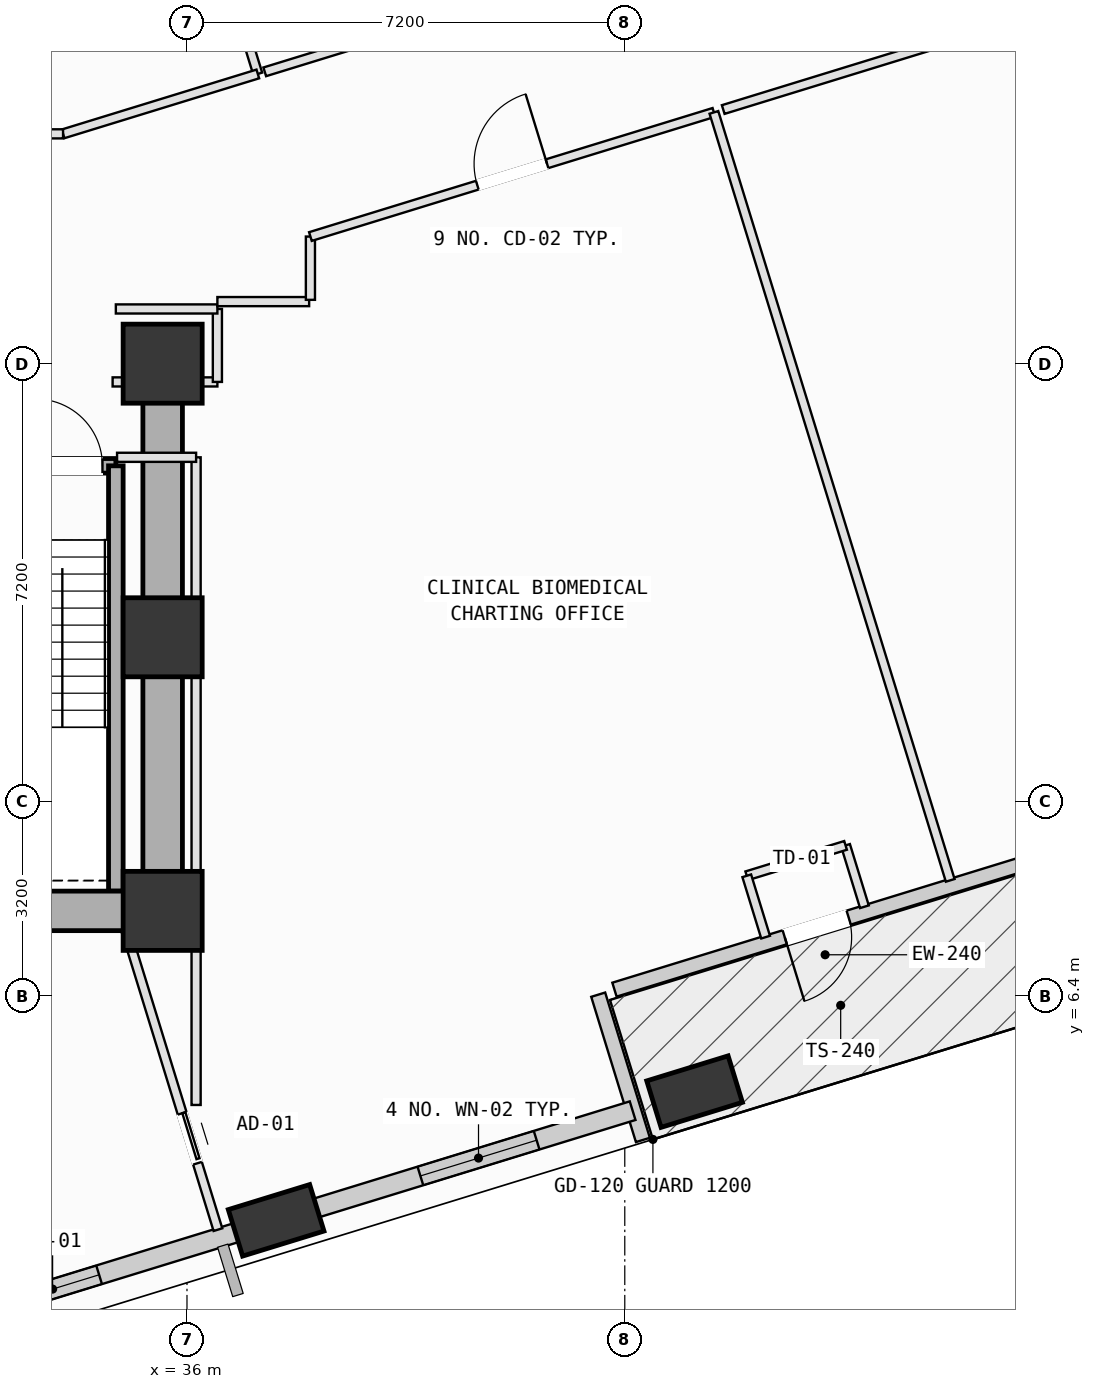
"""IFC4 building model, lengths in metres.
Left out: names, types, materials, properties, quantities, classifications, styles, units other than length and angle.
Written with IfcOpenShell. Run it as: python <this file> out.ifc"""

import sys

from ifc_helpers import new_model, si_unit, direction, frame, frame_2d, origin, origin_2d, place, context, subcontext, project, spatial, rectangle, extrude, element, fill, save


model = new_model("IFC4")
c1 = context("Model", 3, precision=1e-05, world=origin(), true_north=direction((0.0, 1.0)))
c2 = subcontext(c1, "Body", "Model", "MODEL_VIEW")
j1 = project(units=[si_unit("LENGTHUNIT", "METRE"), si_unit("PLANEANGLEUNIT", "RADIAN")], contexts=[c1])
p1 = place(None, origin())
s1 = spatial("IfcSite", under=j1, at=p1, CompositionType="ELEMENT")
p2 = place(p1, origin())
s2 = spatial("IfcBuilding", under=s1, at=p2, CompositionType="ELEMENT")
p3 = place(p2, frame((0.0, 0.0, 96.4)))
s3 = spatial("IfcBuildingStorey", under=s2, at=p3, CompositionType="ELEMENT", Elevation=96.4)
for number, where, z_axis, x_axis in (
    (1, (35.6, 7.8, 0.0), (0.0, 0.0, 1.0), (1.0, 0.0, 0.0)),
    (2, (35.6, 12.3, 0.0), (0.0, 0.0, 1.0), (1.0, 0.0, 0.0)),
    (3, (35.6, 16.8, 0.0), (0.0, 0.0, 1.0), (1.0, 0.0, 0.0)),
):
    element("IfcColumn", number, at=place(p3, frame(where, z_axis=z_axis, x_axis=x_axis)), inside=s3, PredefinedType="COLUMN", context=c2, shape_type="SweptSolid", body=[
        extrude(rectangle(XDim=1.3, YDim=1.3, at=origin_2d()), origin(), (0.0, 0.0, 1.0), 4.0),
    ])
p4 = place(p3, frame((37.466, 2.71, 0.002), z_axis=(0.091060551316, 0.016727890188, 0.995704852697), x_axis=(-0.460649221978, 0.887164683089, 0.027223507694)))
e4 = element("IfcColumn", 4, at=p4, inside=s3, PredefinedType="COLUMN", context=c2, shape_type="SweptSolid", body=[
    extrude(rectangle(XDim=1.4, YDim=0.8, at=origin_2d()), origin(), (0.0, 0.0, 1.0), 4.014),
])
p5 = place(p3, frame((44.348, 4.827, 0.002), z_axis=(0.082049974213, 0.045069704145, 0.995608619639), x_axis=(-0.716749237193, 0.696787516623, 0.027526126896)))
e5 = element("IfcColumn", 5, at=p5, inside=s3, PredefinedType="COLUMN", context=c2, shape_type="SweptSolid", body=[
    extrude(rectangle(XDim=1.4, YDim=0.8, at=origin_2d()), origin(), (0.0, 0.0, 1.0), 4.014),
])
p6 = place(p3, frame((49.683, 8.551, 0.0), z_axis=(0.0, 0.0, 1.0), x_axis=(-0.955788867777, -0.294053804998, 0.0)))
e6 = element("IfcWall", 6, at=p6, inside=s3, PredefinedType="SOLIDWALL", context=c2, shape_type="SweptSolid", body=[
    extrude(rectangle(XDim=6.96, YDim=0.24, at=frame_2d((3.48, 0.0))), origin(), (0.0, 0.0, 1.0), 3.165),
])
p7 = place(p6, frame((2.93, 0.0, 0.0)))
e7 = element("IfcOpeningElement", 7, at=p7, cuts=e6, PredefinedType="OPENING", context=c2, shape_type="SweptSolid", body=[
    extrude(rectangle(XDim=1.1, YDim=2.15, at=frame_2d((0.55, 1.075))), frame((0.0, 0.13, 0.0), z_axis=(0.0, -1.0, 0.0), x_axis=(1.0, 0.0, 0.0)), (0.0, 0.0, 1.0), 0.26),
])
p8 = place(p3, frame((42.763, 6.422, 0.0), z_axis=(0.0, 0.0, 1.0), x_axis=(0.294051535993, -0.955789565846, 0.0)))
e8 = element("IfcWall", 8, at=p8, inside=s3, PredefinedType="SOLIDWALL", context=c2, shape_type="SweptSolid", body=[
    extrude(rectangle(XDim=2.5, YDim=0.24, at=frame_2d((1.25, 0.0))), origin(), (0.0, 0.0, 1.0), 3.165),
])
p9 = place(p3, frame((37.169, 2.619, 0.0), z_axis=(0.0, 0.0, 1.0), x_axis=(-0.955784954734, -0.294066523602, 0.0)))
e9 = element("IfcWall", 9, at=p9, inside=s3, PredefinedType="SOLIDWALL", context=c2, shape_type="SweptSolid", body=[
    extrude(rectangle(XDim=6.214, YDim=0.32, at=frame_2d((3.107, 0.0))), origin(), (0.0, 0.0, 1.0), 3.165),
])
p10 = place(p9, frame((2.735, 0.0, 0.75)))
e10 = element("IfcOpeningElement", 10, at=p10, cuts=e9, PredefinedType="OPENING", context=c2, shape_type="SweptSolid", body=[
    extrude(rectangle(XDim=1.6, YDim=1.95, at=frame_2d((0.8, 0.975))), frame((0.0, 0.17, 0.0), z_axis=(0.0, -1.0, 0.0), x_axis=(1.0, 0.0, 0.0)), (0.0, 0.0, 1.0), 0.34),
])
p11 = place(p3, frame((43.329, 4.514, 0.0), z_axis=(0.0, 0.0, 1.0), x_axis=(-0.955798364911, -0.294022933855, 0.0)))
e11 = element("IfcWall", 11, at=p11, inside=s3, PredefinedType="SOLIDWALL", context=c2, shape_type="SweptSolid", body=[
    extrude(rectangle(XDim=5.454, YDim=0.32, at=frame_2d((2.727, 0.0))), origin(), (0.0, 0.0, 1.0), 3.165),
])
p12 = place(p11, frame((1.652, 0.0, 0.75)))
e12 = element("IfcOpeningElement", 12, at=p12, cuts=e11, PredefinedType="OPENING", context=c2, shape_type="SweptSolid", body=[
    extrude(rectangle(XDim=2.0, YDim=1.95, at=frame_2d((1.0, 0.975))), frame((0.0, 0.17, 0.0), z_axis=(0.0, -1.0, 0.0), x_axis=(1.0, 0.0, 0.0)), (0.0, 0.0, 1.0), 0.34),
])
p13 = place(p3, frame((28.219, 21.732, 0.0), z_axis=(0.0, 0.0, 1.0), x_axis=(0.955798491071, 0.294022523738, 0.0)))
e13 = element("IfcWall", 13, at=p13, inside=s3, PredefinedType="SOLIDWALL", context=c2, shape_type="SweptSolid", body=[
    extrude(rectangle(XDim=5.96, YDim=0.32, at=frame_2d((2.98, 0.0))), origin(), (0.0, 0.0, 1.0), 3.165),
])
p14 = place(p3, frame((31.37, 15.12, 0.0), z_axis=(0.0, 0.0, 1.0), x_axis=(1.0, 0.0, 0.0)))
e14 = element("IfcWall", 14, at=p14, inside=s3, PredefinedType="SOLIDWALL", context=c2, shape_type="SweptSolid", body=[
    extrude(rectangle(XDim=3.46, YDim=0.24, at=frame_2d((1.73, 0.0))), origin(), (0.0, 0.0, 1.0), 3.78),
])
p15 = place(p14, frame((2.14, 0.0, 0.0)))
e15 = element("IfcOpeningElement", 15, at=p15, cuts=e14, PredefinedType="OPENING", context=c2, shape_type="SweptSolid", body=[
    extrude(rectangle(XDim=1.1, YDim=2.15, at=frame_2d((0.55, 1.075))), frame((0.0, 0.13, 0.0), z_axis=(0.0, -1.0, 0.0), x_axis=(1.0, 0.0, 0.0)), (0.0, 0.0, 1.0), 0.26),
])
p16 = place(p3, frame((34.83, 15.12, 0.0), z_axis=(0.0, 0.0, 1.0), x_axis=(0.0, -1.0, 0.0)))
e16 = element("IfcWall", 16, at=p16, inside=s3, PredefinedType="SOLIDWALL", context=c2, shape_type="SweptSolid", body=[
    extrude(rectangle(XDim=6.995, YDim=0.24, at=frame_2d((3.498, 0.0))), origin(), (0.0, 0.0, 1.0), 3.78),
])
p17 = place(p3, frame((24.8, 7.8, 0.0), z_axis=(0.0, 0.0, 1.0), x_axis=(1.0, 0.0, 0.0)))
e17 = element("IfcWall", 17, at=p17, inside=s3, PredefinedType="SHEAR", context=c2, shape_type="SweptSolid", body=[
    extrude(rectangle(XDim=10.8, YDim=0.65, at=frame_2d((5.4, 0.0))), origin(), (0.0, 0.0, 1.0), 3.78),
])
p18 = place(p3, frame((35.6, 7.8, 0.0), z_axis=(0.0, 0.0, 1.0), x_axis=(0.0, 1.0, 0.0)))
e18 = element("IfcWall", 18, at=p18, inside=s3, PredefinedType="SHEAR", context=c2, shape_type="SweptSolid", body=[
    extrude(rectangle(XDim=9.0, YDim=0.65, at=frame_2d((4.5, 0.0))), origin(), (0.0, 0.0, 1.0), 3.78),
])
p19 = place(p3, frame((34.988, 7.5, 0.0), z_axis=(0.0, 0.0, 1.0), x_axis=(0.294092483167, -0.955776967365, 0.0)))
e19 = element("IfcWall", 19, at=p19, inside=s3, PredefinedType="PARTITIONING", context=c2, shape_type="SweptSolid", body=[
    extrude(rectangle(XDim=5.172, YDim=0.15, at=frame_2d((2.586, 0.0))), origin(), (0.0, 0.0, 1.0), 3.78),
])
p20 = place(p19, frame((3.169, 0.0, 0.0)))
e20 = element("IfcOpeningElement", 20, at=p20, cuts=e19, PredefinedType="OPENING", context=c2, shape_type="SweptSolid", body=[
    extrude(rectangle(XDim=0.86, YDim=2.06, at=frame_2d((0.43, 1.03))), frame((0.0, 0.085, 0.0), z_axis=(0.0, -1.0, 0.0), x_axis=(1.0, 0.0, 0.0)), (0.0, 0.0, 1.0), 0.17),
])
p21 = place(p3, frame((36.15, 4.608, 0.0), z_axis=(0.0, 0.0, 1.0), x_axis=(0.0, 1.0, 0.0)))
e21 = element("IfcWall", 21, at=p21, inside=s3, PredefinedType="PARTITIONING", context=c2, shape_type="SweptSolid", body=[
    extrude(rectangle(XDim=10.652, YDim=0.15, at=frame_2d((5.326, 0.0))), origin(), (0.0, 0.0, 1.0), 3.78),
])
p22 = place(p3, frame((36.15, 15.26, 0.0), z_axis=(0.0, 0.0, 1.0), x_axis=(-1.0, 0.0, 0.0)))
e22 = element("IfcWall", 22, at=p22, inside=s3, PredefinedType="PARTITIONING", context=c2, shape_type="SweptSolid", body=[
    extrude(rectangle(XDim=1.3, YDim=0.15, at=frame_2d((0.65, 0.0))), origin(), (0.0, 0.0, 1.0), 3.78),
])
p23 = place(p3, frame((34.777, 16.5, 0.0), z_axis=(0.0, 0.0, 1.0), x_axis=(1.0, 0.0, 0.0)))
e23 = element("IfcWall", 23, at=p23, inside=s3, PredefinedType="PARTITIONING", context=c2, shape_type="SweptSolid", body=[
    extrude(rectangle(XDim=1.723, YDim=0.15, at=frame_2d((0.861, 0.0))), origin(), (0.0, 0.0, 1.0), 2.965),
])
p24 = place(p3, frame((36.5, 16.5, 0.0), z_axis=(0.0, 0.0, 1.0), x_axis=(0.0, 1.0, 0.0)))
e24 = element("IfcWall", 24, at=p24, inside=s3, PredefinedType="PARTITIONING", context=c2, shape_type="SweptSolid", body=[
    extrude(rectangle(XDim=1.2, YDim=0.15, at=frame_2d((0.6, 0.0))), origin(), (0.0, 0.0, 1.0), 3.78),
])
p25 = place(p3, frame((36.5, 17.7, 0.0), z_axis=(0.0, 0.0, 1.0), x_axis=(-1.0, 0.0, 0.0)))
e25 = element("IfcWall", 25, at=p25, inside=s3, PredefinedType="PARTITIONING", context=c2, shape_type="SweptSolid", body=[
    extrude(rectangle(XDim=1.67, YDim=0.15, at=frame_2d((0.835, 0.0))), origin(), (0.0, 0.0, 1.0), 3.78),
])
p26 = place(p3, frame((36.5, 17.821, 0.0), z_axis=(0.0, 0.0, 1.0), x_axis=(1.0, 0.0, 0.0)))
e26 = element("IfcWall", 26, at=p26, inside=s3, PredefinedType="PARTITIONING", context=c2, shape_type="SweptSolid", body=[
    extrude(rectangle(XDim=1.509, YDim=0.15, at=frame_2d((0.754, 0.0))), origin(), (0.0, 0.0, 1.0), 3.78),
])
p27 = place(p3, frame((38.03, 17.85, 0.0), z_axis=(0.0, 0.0, 1.0), x_axis=(0.0, 1.0, 0.0)))
e27 = element("IfcWall", 27, at=p27, inside=s3, PredefinedType="PARTITIONING", context=c2, shape_type="SweptSolid", body=[
    extrude(rectangle(XDim=1.041, YDim=0.15, at=frame_2d((0.521, 0.0))), origin(), (0.0, 0.0, 1.0), 3.78),
])
p28 = place(p3, frame((38.03, 18.891, 0.0), z_axis=(0.0, 0.0, 1.0), x_axis=(0.955772926222, 0.294105616236, 0.0)))
e28 = element("IfcWall", 28, at=p28, inside=s3, PredefinedType="PARTITIONING", context=c2, shape_type="SweptSolid", body=[
    extrude(rectangle(XDim=6.943, YDim=0.15, at=frame_2d((3.472, 0.0))), origin(), (0.0, 0.0, 1.0), 2.945),
])
p29 = place(p28, frame((2.872, 0.0, 0.0)))
e29 = element("IfcOpeningElement", 29, at=p29, cuts=e28, PredefinedType="OPENING", context=c2, shape_type="SweptSolid", body=[
    extrude(rectangle(XDim=1.2, YDim=2.15, at=frame_2d((0.6, 1.075))), frame((0.0, 0.085, 0.0), z_axis=(0.0, -1.0, 0.0), x_axis=(1.0, 0.0, 0.0)), (0.0, 0.0, 1.0), 0.17),
])
p30 = place(p3, frame((44.666, 20.933, 0.0), z_axis=(0.0, 0.0, 1.0), x_axis=(0.294050797953, -0.955789792906, 0.0)))
e30 = element("IfcWall", 30, at=p30, inside=s3, PredefinedType="PARTITIONING", context=c2, shape_type="SweptSolid", body=[
    extrude(rectangle(XDim=13.215, YDim=0.15, at=frame_2d((6.608, 0.0))), origin(), (0.0, 0.0, 1.0), 3.78),
])
p31 = place(p3, frame((47.141, 7.868, 0.0), z_axis=(0.0, 0.0, 1.0), x_axis=(-0.293728278621, 0.955888957117, 0.0)))
e31 = element("IfcWall", 31, at=p31, inside=s3, PredefinedType="PARTITIONING", context=c2, shape_type="SweptSolid", body=[
    extrude(rectangle(XDim=1.056, YDim=0.15, at=frame_2d((0.528, 0.0))), origin(), (0.0, 0.0, 1.0), 3.78),
])
p32 = place(p3, frame((46.831, 8.877, 0.0), z_axis=(0.0, 0.0, 1.0), x_axis=(-0.955779008722, -0.294085848838, 0.0)))
e32 = element("IfcWall", 32, at=p32, inside=s3, PredefinedType="PARTITIONING", context=c2, shape_type="SweptSolid", body=[
    extrude(rectangle(XDim=1.7, YDim=0.15, at=frame_2d((0.85, 0.0))), origin(), (0.0, 0.0, 1.0), 3.78),
])
p33 = place(p3, frame((45.206, 8.377, 0.0), z_axis=(0.0, 0.0, 1.0), x_axis=(0.293728278621, -0.955888957117, 0.0)))
e33 = element("IfcWall", 33, at=p33, inside=s3, PredefinedType="PARTITIONING", context=c2, shape_type="SweptSolid", body=[
    extrude(rectangle(XDim=1.056, YDim=0.15, at=frame_2d((0.528, 0.0))), origin(), (0.0, 0.0, 1.0), 3.78),
])
p34 = place(p3, frame((38.184, 2.69, 0.0), z_axis=(0.0, 0.0, 1.0), x_axis=(-0.95597043772, -0.293462982684, 0.0)))
e34 = element("IfcWall", 34, at=p34, inside=s3, PredefinedType="PARTITIONING", context=c2, shape_type="SweptSolid", body=[
    extrude(rectangle(XDim=0.992, YDim=0.15, at=frame_2d((0.496, 0.0))), origin(), (0.0, 0.0, 1.0), 3.165),
])
p35 = place(p3, frame((44.819, 20.98, 0.0), z_axis=(0.0, 0.0, 1.0), x_axis=(0.955786946021, 0.294060051378, 0.0)))
e35 = element("IfcWall", 35, at=p35, inside=s3, PredefinedType="PARTITIONING", context=c2, shape_type="SweptSolid", body=[
    extrude(rectangle(XDim=10.64, YDim=0.15, at=frame_2d((5.32, 0.0))), origin(), (0.0, 0.0, 1.0), 3.78),
])
p36 = place(p35, frame((4.72, 0.0, 0.0)))
e36 = element("IfcOpeningElement", 36, at=p36, cuts=e35, PredefinedType="OPENING", context=c2, shape_type="SweptSolid", body=[
    extrude(rectangle(XDim=1.2, YDim=2.15, at=frame_2d((0.6, 1.075))), frame((0.0, 0.085, 0.0), z_axis=(0.0, -1.0, 0.0), x_axis=(1.0, 0.0, 0.0)), (0.0, 0.0, 1.0), 0.17),
])
p37 = place(p3, frame((36.384, 24.103, 0.0), z_axis=(0.0, 0.0, 1.0), x_axis=(0.294105230009, -0.955773045069, 0.0)))
e37 = element("IfcWall", 37, at=p37, inside=s3, PredefinedType="PARTITIONING", context=c2, shape_type="SweptSolid", body=[
    extrude(rectangle(XDim=2.656, YDim=0.15, at=frame_2d((1.328, 0.0))), origin(), (0.0, 0.0, 1.0), 3.78),
])
p38 = place(p3, frame((37.165, 21.565, 0.0), z_axis=(0.0, 0.0, 1.0), x_axis=(-0.955838846993, -0.293891304022, 0.0)))
e38 = element("IfcWall", 38, at=p38, inside=s3, PredefinedType="PARTITIONING", context=c2, shape_type="SweptSolid", body=[
    extrude(rectangle(XDim=3.351, YDim=0.15, at=frame_2d((1.676, 0.0))), origin(), (0.0, 0.0, 1.0), 3.78),
])
p39 = place(p3, frame((33.962, 20.58, 0.0), z_axis=(0.0, 0.0, 1.0), x_axis=(-1.0, 0.0, 0.0)))
e39 = element("IfcWall", 39, at=p39, inside=s3, PredefinedType="PARTITIONING", context=c2, shape_type="SweptSolid", body=[
    extrude(rectangle(XDim=13.125, YDim=0.15, at=frame_2d((6.562, 0.0))), origin(), (0.0, 0.0, 1.0), 3.78),
])
p40 = place(p39, frame((7.326, 0.0, 0.0)))
e40 = element("IfcOpeningElement", 40, at=p40, cuts=e39, PredefinedType="OPENING", context=c2, shape_type="SweptSolid", body=[
    extrude(rectangle(XDim=1.2, YDim=2.15, at=frame_2d((0.6, 1.075))), frame((0.0, 0.085, 0.0), z_axis=(0.0, -1.0, 0.0), x_axis=(1.0, 0.0, 0.0)), (0.0, 0.0, 1.0), 0.17),
])
p41 = place(p3, frame((48.994, 25.204, 0.0), z_axis=(0.0, 0.0, 1.0), x_axis=(-0.955791928213, -0.294043857208, 0.0)))
e41 = element("IfcWall", 41, at=p41, inside=s3, PredefinedType="PARTITIONING", context=c2, shape_type="SweptSolid", body=[
    extrude(rectangle(XDim=12.257, YDim=0.15, at=frame_2d((6.128, 0.0))), origin(), (0.0, 0.0, 1.0), 2.945),
])
p42 = place(p41, frame((5.528, 0.0, 0.0)))
e42 = element("IfcOpeningElement", 42, at=p42, cuts=e41, PredefinedType="OPENING", context=c2, shape_type="SweptSolid", body=[
    extrude(rectangle(XDim=1.2, YDim=2.15, at=frame_2d((0.6, 1.075))), frame((0.0, 0.085, 0.0), z_axis=(0.0, -1.0, 0.0), x_axis=(1.0, 0.0, 0.0)), (0.0, 0.0, 1.0), 0.17),
])
p43 = place(p7, origin())
e43 = element("IfcDoor", 43, at=p43, inside=s3, OperationType="SINGLE_SWING_RIGHT", PredefinedType="DOOR", context=c2, shape_type="SweptSolid", body=[
    extrude(rectangle(XDim=1.1, YDim=2.15, at=frame_2d((0.55, 1.075))), frame((0.0, 0.025, 0.0), z_axis=(0.0, -1.0, 0.0), x_axis=(1.0, 0.0, 0.0)), (0.0, 0.0, 1.0), 0.05),
])
fill(e7, e43)
p44 = place(p10, origin())
e44 = element("IfcWindow", 44, at=p44, inside=s3, PartitioningType="SINGLE_PANEL", PredefinedType="WINDOW", context=c2, shape_type="SweptSolid", body=[
    extrude(rectangle(XDim=1.6, YDim=1.95, at=frame_2d((0.8, 0.975))), frame((0.0, 0.03, 0.0), z_axis=(0.0, -1.0, 0.0), x_axis=(1.0, 0.0, 0.0)), (0.0, 0.0, 1.0), 0.06),
])
fill(e10, e44)
p45 = place(p12, origin())
e45 = element("IfcWindow", 45, at=p45, inside=s3, PartitioningType="SINGLE_PANEL", PredefinedType="WINDOW", context=c2, shape_type="SweptSolid", body=[
    extrude(rectangle(XDim=2.0, YDim=1.95, at=frame_2d((1.0, 0.975))), frame((0.0, 0.03, 0.0), z_axis=(0.0, -1.0, 0.0), x_axis=(1.0, 0.0, 0.0)), (0.0, 0.0, 1.0), 0.06),
])
fill(e12, e45)
p46 = place(p15, origin())
e46 = element("IfcDoor", 46, at=p46, inside=s3, OperationType="SINGLE_SWING_LEFT", PredefinedType="DOOR", context=c2, shape_type="SweptSolid", body=[
    extrude(rectangle(XDim=1.1, YDim=2.15, at=frame_2d((0.55, 1.075))), frame((0.0, 0.025, 0.0), z_axis=(0.0, -1.0, 0.0), x_axis=(1.0, 0.0, 0.0)), (0.0, 0.0, 1.0), 0.05),
])
fill(e15, e46)
p47 = place(p29, origin())
e47 = element("IfcDoor", 47, at=p47, inside=s3, OperationType="SINGLE_SWING_RIGHT", PredefinedType="DOOR", context=c2, shape_type="SweptSolid", body=[
    extrude(rectangle(XDim=1.2, YDim=2.15, at=frame_2d((0.6, 1.075))), frame((0.0, 0.025, 0.0), z_axis=(0.0, -1.0, 0.0), x_axis=(1.0, 0.0, 0.0)), (0.0, 0.0, 1.0), 0.05),
])
fill(e29, e47)
p48 = place(p20, origin())
e48 = element("IfcDoor", 48, at=p48, inside=s3, OperationType="SLIDING_TO_LEFT", PredefinedType="DOOR", context=c2, shape_type="SweptSolid", body=[
    extrude(rectangle(XDim=0.86, YDim=2.06, at=frame_2d((0.43, 1.03))), frame((0.0, 0.025, 0.0), z_axis=(0.0, -1.0, 0.0), x_axis=(1.0, 0.0, 0.0)), (0.0, 0.0, 1.0), 0.05),
])
fill(e20, e48)
save(model, sys.argv[1])
